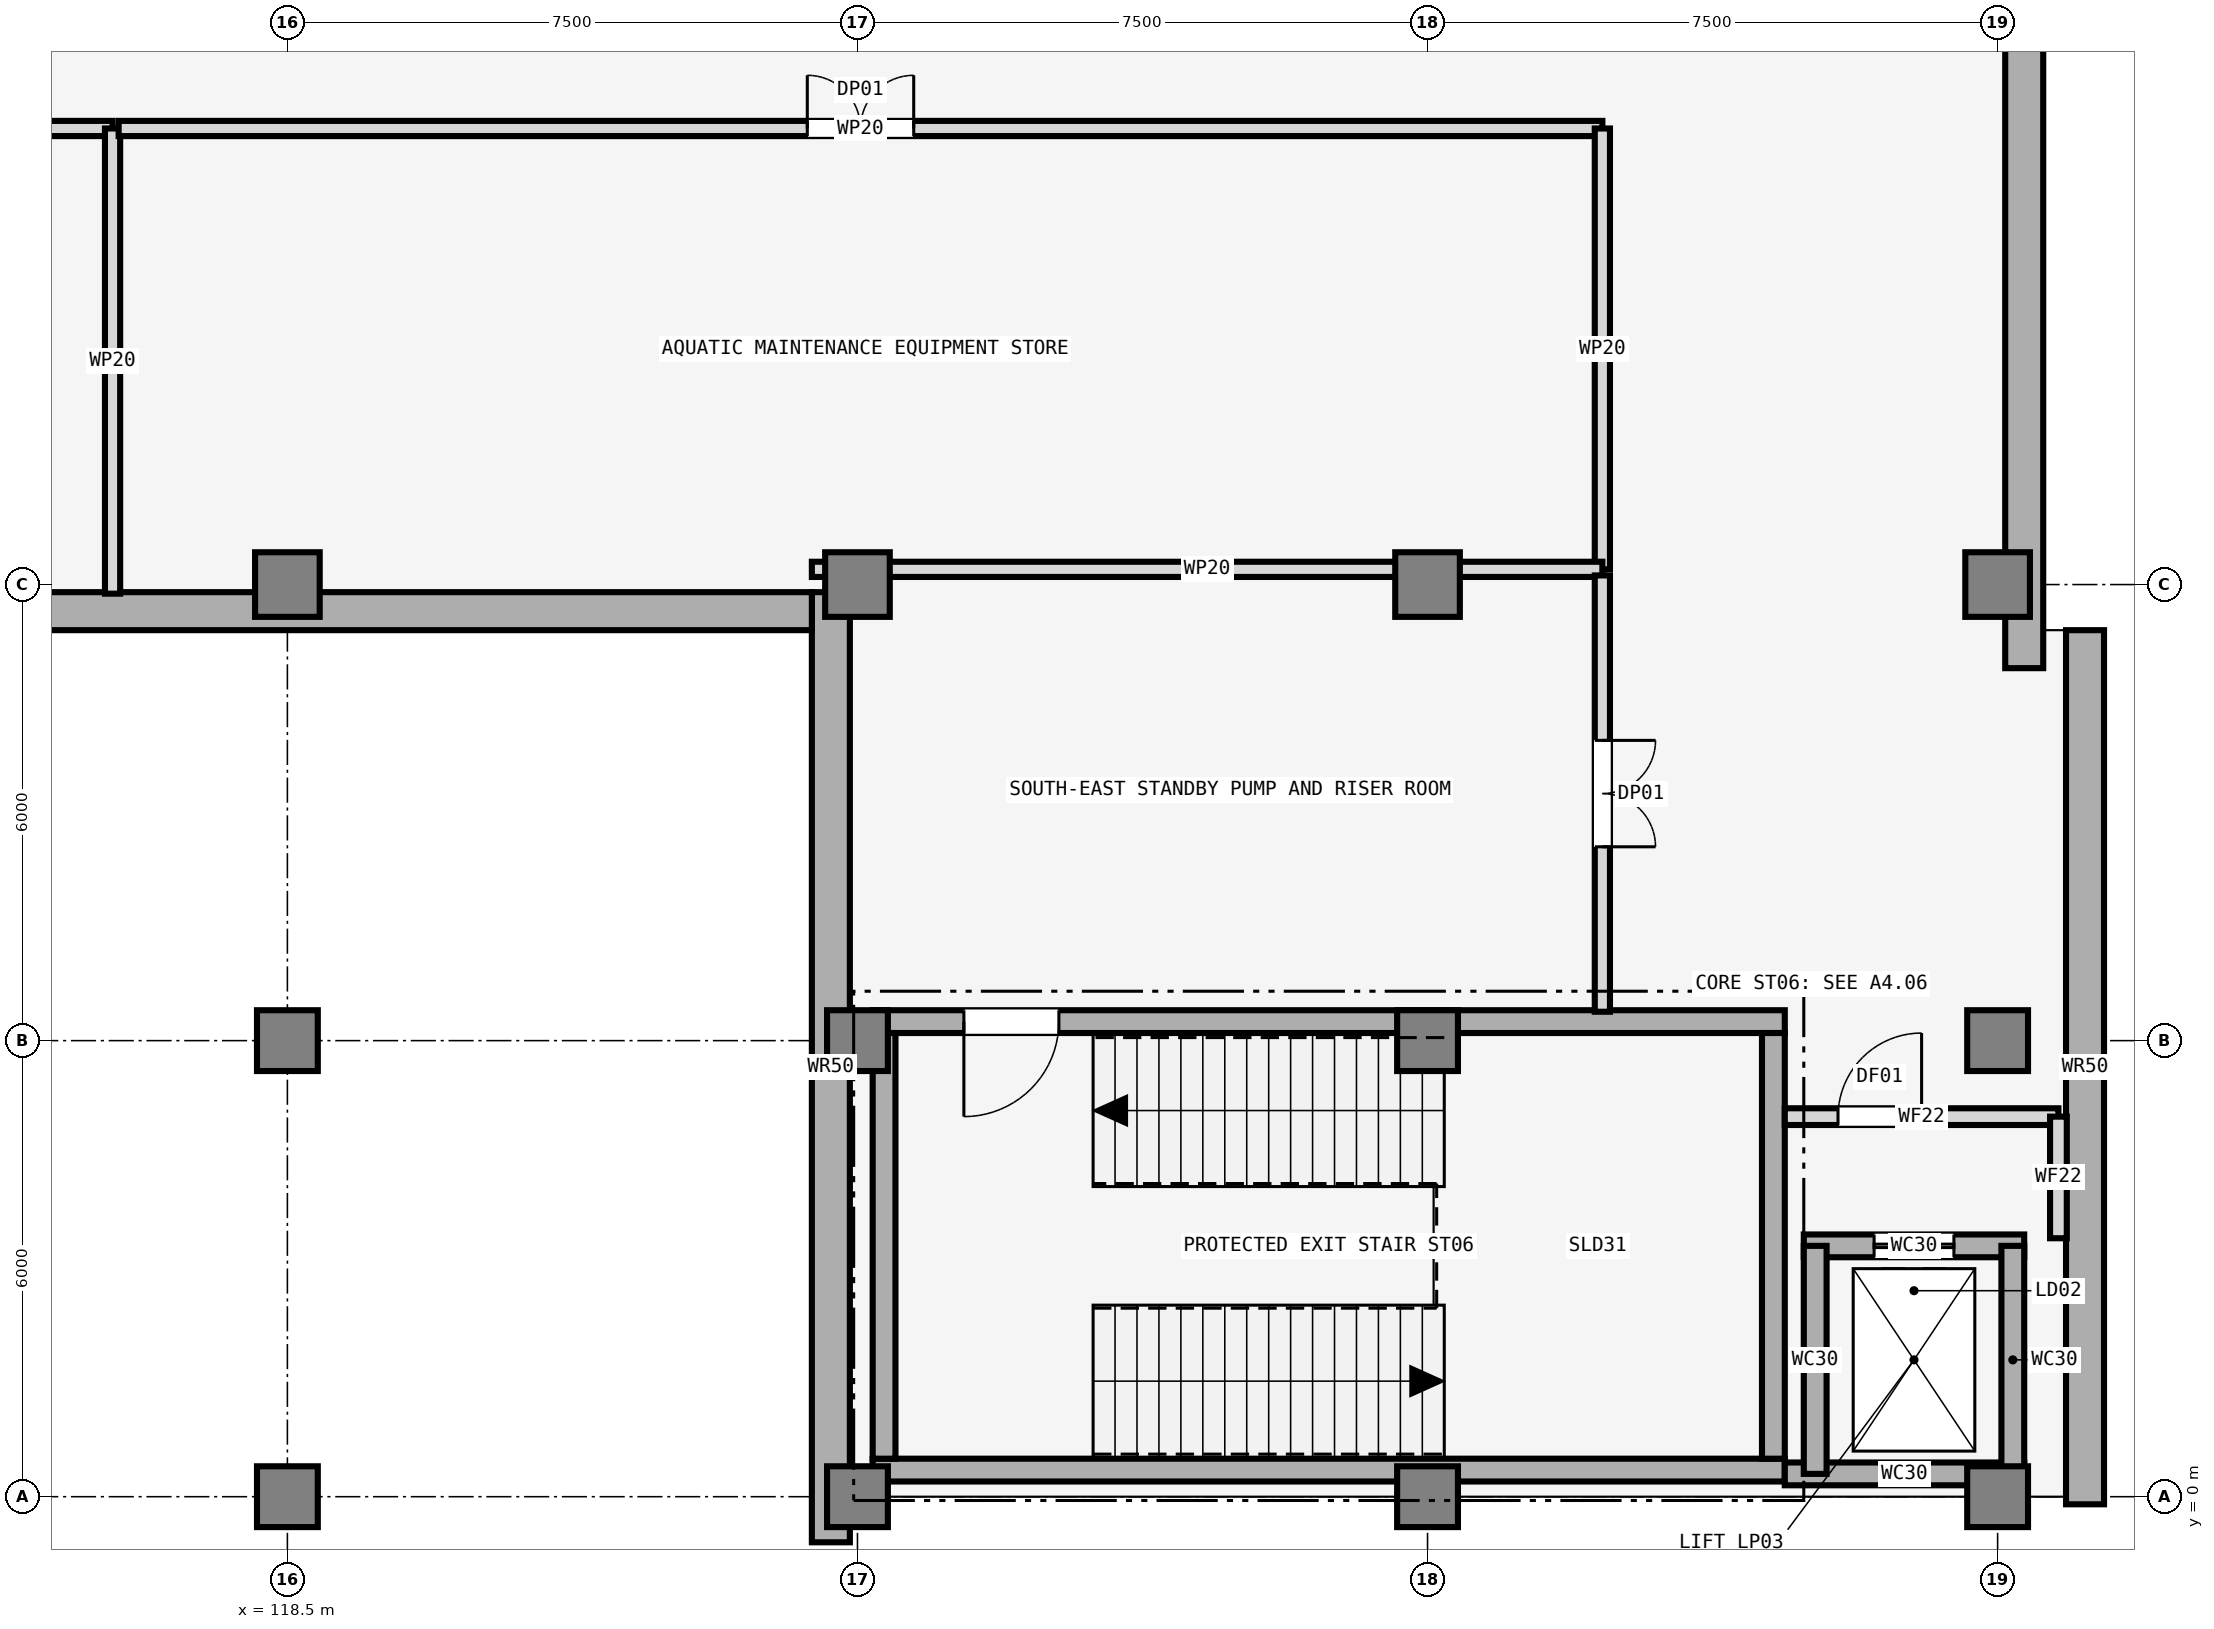
"""IFC4 building model, lengths in metres.
Left out: names, types, materials, properties, quantities, classifications, styles, units other than length and angle.
Written with IfcOpenShell. Run it as: python <this file> out.ifc"""

import sys

from ifc_helpers import new_model, si_unit, direction, frame, frame_2d, origin, origin_2d, place, context, subcontext, project, spatial, rectangle, extrude, element, fill, save


model = new_model("IFC4")
c1 = context("Model", 3, precision=1e-05, world=origin(), true_north=direction((0.0, 1.0)))
c2 = subcontext(c1, "Body", "Model", "MODEL_VIEW")
j1 = project(units=[si_unit("LENGTHUNIT", "METRE"), si_unit("PLANEANGLEUNIT", "RADIAN")], contexts=[c1])
p1 = place(None, origin())
s1 = spatial("IfcSite", under=j1, at=p1, CompositionType="ELEMENT")
p2 = place(p1, origin())
s2 = spatial("IfcBuilding", under=s1, at=p2, CompositionType="ELEMENT")
p3 = place(p2, frame((0.0, 0.0, -5.4)))
s3 = spatial("IfcBuildingStorey", under=s2, at=p3, CompositionType="ELEMENT", Elevation=-5.4)
p4 = place(p3, frame((141.35, 58.6, 0.0), z_axis=(0.0, 0.0, 1.0), x_axis=(0.0, -1.0, 0.0)))
e1 = element("IfcWall", 1, at=p4, inside=s3, PredefinedType="USERDEFINED", context=c2, shape_type="SweptSolid", body=[
    extrude(rectangle(XDim=47.7, YDim=0.5, at=frame_2d((23.85, 0.0))), origin(), (0.0, 0.0, 1.0), 5.08),
])
p5 = place(p3, frame((142.15, 11.4, 0.0), z_axis=(0.0, 0.0, 1.0), x_axis=(0.0, -1.0, 0.0)))
e2 = element("IfcWall", 2, at=p5, inside=s3, PredefinedType="USERDEFINED", context=c2, shape_type="SweptSolid", body=[
    extrude(rectangle(XDim=11.5, YDim=0.5, at=frame_2d((5.75, 0.0))), origin(), (0.0, 0.0, 1.0), 5.08),
])
p6 = place(p3, frame((142.4, -0.35, 0.0), z_axis=(0.0, 0.0, 1.0), x_axis=(-1.0, 0.0, 0.0)))
e3 = element("IfcWall", 3, at=p6, inside=s3, PredefinedType="USERDEFINED", context=c2, shape_type="SweptSolid", body=[
    extrude(rectangle(XDim=16.5, YDim=0.5, at=frame_2d((8.25, 0.0))), origin(), (0.0, 0.0, 1.0), 5.08),
])
p7 = place(p3, frame((125.65, -0.6, 0.0), z_axis=(0.0, 0.0, 1.0), x_axis=(0.0, 1.0, 0.0)))
e4 = element("IfcWall", 4, at=p7, inside=s3, PredefinedType="USERDEFINED", context=c2, shape_type="SweptSolid", body=[
    extrude(rectangle(XDim=12.5, YDim=0.5, at=frame_2d((6.25, 0.0))), origin(), (0.0, 0.0, 1.0), 5.08),
])
p8 = place(p3, frame((125.4, 11.65, 0.0), z_axis=(0.0, 0.0, 1.0), x_axis=(-1.0, 0.0, 0.0)))
e5 = element("IfcWall", 5, at=p8, inside=s3, PredefinedType="USERDEFINED", context=c2, shape_type="SweptSolid", body=[
    extrude(rectangle(XDim=69.6, YDim=0.5, at=frame_2d((34.8, 0.0))), origin(), (0.0, 0.0, 1.0), 5.08),
])
for number, where, z_axis, x_axis in (
    (6, (118.5, 0.0, 0.0), (0.0, 0.0, 1.0), (1.0, 0.0, 0.0)),
    (7, (118.5, 6.0, 0.0), (0.0, 0.0, 1.0), (1.0, 0.0, 0.0)),
):
    element("IfcColumn", number, at=place(p3, frame(where, z_axis=z_axis, x_axis=x_axis)), inside=s3, PredefinedType="COLUMN", context=c2, shape_type="SweptSolid", body=[
        extrude(rectangle(XDim=0.8, YDim=0.8, at=origin_2d()), origin(), (0.0, 0.0, 1.0), 5.4),
    ])
p9 = place(p3, frame((118.5, 12.0, 0.0), z_axis=(0.0, 0.0, 1.0), x_axis=(1.0, 0.0, 0.0)))
e8 = element("IfcColumn", 8, at=p9, inside=s3, PredefinedType="COLUMN", context=c2, shape_type="SweptSolid", body=[
    extrude(rectangle(XDim=0.85, YDim=0.85, at=origin_2d()), origin(), (0.0, 0.0, 1.0), 5.4),
])
for number, where, z_axis, x_axis in (
    (9, (126.0, 0.0, 0.0), (0.0, 0.0, 1.0), (1.0, 0.0, 0.0)),
    (10, (126.0, 6.0, 0.0), (0.0, 0.0, 1.0), (1.0, 0.0, 0.0)),
):
    element("IfcColumn", number, at=place(p3, frame(where, z_axis=z_axis, x_axis=x_axis)), inside=s3, PredefinedType="COLUMN", context=c2, shape_type="SweptSolid", body=[
        extrude(rectangle(XDim=0.8, YDim=0.8, at=origin_2d()), origin(), (0.0, 0.0, 1.0), 5.4),
    ])
p10 = place(p3, frame((126.0, 12.0, 0.0), z_axis=(0.0, 0.0, 1.0), x_axis=(1.0, 0.0, 0.0)))
e11 = element("IfcColumn", 11, at=p10, inside=s3, PredefinedType="COLUMN", context=c2, shape_type="SweptSolid", body=[
    extrude(rectangle(XDim=0.85, YDim=0.85, at=origin_2d()), origin(), (0.0, 0.0, 1.0), 5.4),
])
for number, where, z_axis, x_axis in (
    (12, (133.5, 0.0, 0.0), (0.0, 0.0, 1.0), (1.0, 0.0, 0.0)),
    (13, (133.5, 6.0, 0.0), (0.0, 0.0, 1.0), (1.0, 0.0, 0.0)),
):
    element("IfcColumn", number, at=place(p3, frame(where, z_axis=z_axis, x_axis=x_axis)), inside=s3, PredefinedType="COLUMN", context=c2, shape_type="SweptSolid", body=[
        extrude(rectangle(XDim=0.8, YDim=0.8, at=origin_2d()), origin(), (0.0, 0.0, 1.0), 5.4),
    ])
p11 = place(p3, frame((133.5, 12.0, 0.0), z_axis=(0.0, 0.0, 1.0), x_axis=(1.0, 0.0, 0.0)))
e14 = element("IfcColumn", 14, at=p11, inside=s3, PredefinedType="COLUMN", context=c2, shape_type="SweptSolid", body=[
    extrude(rectangle(XDim=0.85, YDim=0.85, at=origin_2d()), origin(), (0.0, 0.0, 1.0), 5.4),
])
for number, where, z_axis, x_axis in (
    (15, (141.0, 0.0, 0.0), (0.0, 0.0, 1.0), (1.0, 0.0, 0.0)),
    (16, (141.0, 6.0, 0.0), (0.0, 0.0, 1.0), (1.0, 0.0, 0.0)),
):
    element("IfcColumn", number, at=place(p3, frame(where, z_axis=z_axis, x_axis=x_axis)), inside=s3, PredefinedType="COLUMN", context=c2, shape_type="SweptSolid", body=[
        extrude(rectangle(XDim=0.8, YDim=0.8, at=origin_2d()), origin(), (0.0, 0.0, 1.0), 5.4),
    ])
p12 = place(p3, frame((141.0, 12.0, 0.0), z_axis=(0.0, 0.0, 1.0), x_axis=(1.0, 0.0, 0.0)))
e17 = element("IfcColumn", 17, at=p12, inside=s3, PredefinedType="COLUMN", context=c2, shape_type="SweptSolid", body=[
    extrude(rectangle(XDim=0.85, YDim=0.85, at=origin_2d()), origin(), (0.0, 0.0, 1.0), 5.4),
])
p13 = place(p3, frame((138.2, 0.35, 0.0), z_axis=(0.0, 0.0, 1.0), x_axis=(-1.0, 0.0, 0.0)))
e18 = element("IfcWall", 18, at=p13, inside=s3, PredefinedType="SHEAR", context=c2, shape_type="SweptSolid", body=[
    extrude(rectangle(XDim=12.0, YDim=0.3, at=frame_2d((6.0, 0.0))), origin(), (0.0, 0.0, 1.0), 5.4),
])
p14 = place(p3, frame((138.2, 6.25, 0.0), z_axis=(0.0, 0.0, 1.0), x_axis=(-1.0, 0.0, 0.0)))
e19 = element("IfcWall", 19, at=p14, inside=s3, PredefinedType="SHEAR", context=c2, shape_type="SweptSolid", body=[
    extrude(rectangle(XDim=12.0, YDim=0.3, at=frame_2d((6.0, 0.0))), origin(), (0.0, 0.0, 1.0), 5.4),
])
p15 = place(p14, frame((9.55, 0.0, 0.0)))
e20 = element("IfcOpeningElement", 20, at=p15, cuts=e19, PredefinedType="OPENING", context=c2, shape_type="SweptSolid", body=[
    extrude(rectangle(XDim=1.25, YDim=2.15, at=frame_2d((0.625, 1.075))), frame((0.0, 0.16, 0.0), z_axis=(0.0, -1.0, 0.0), x_axis=(1.0, 0.0, 0.0)), (0.0, 0.0, 1.0), 0.32),
])
for number, where, z_axis, x_axis in (
    (21, (126.35, 6.1, 0.0), (0.0, 0.0, 1.0), (0.0, -1.0, 0.0)),
    (22, (138.05, 0.5, 0.0), (0.0, 0.0, 1.0), (0.0, 1.0, 0.0)),
):
    element("IfcWall", number, at=place(p3, frame(where, z_axis=z_axis, x_axis=x_axis)), inside=s3, PredefinedType="SHEAR", context=c2, shape_type="SweptSolid", body=[
        extrude(rectangle(XDim=5.6, YDim=0.3, at=frame_2d((2.8, 0.0))), origin(), (0.0, 0.0, 1.0), 5.4),
    ])
p16 = place(p3, frame((138.2, 0.3, 0.0), z_axis=(0.0, 0.0, 1.0), x_axis=(1.0, 0.0, 0.0)))
e23 = element("IfcWall", 23, at=p16, inside=s3, PredefinedType="SHEAR", context=c2, shape_type="SweptSolid", body=[
    extrude(rectangle(XDim=3.15, YDim=0.3, at=frame_2d((1.575, 0.0))), origin(), (0.0, 0.0, 1.0), 5.4),
])
p17 = place(p3, frame((141.35, 3.3, 0.0), z_axis=(0.0, 0.0, 1.0), x_axis=(-1.0, 0.0, 0.0)))
e24 = element("IfcWall", 24, at=p17, inside=s3, PredefinedType="SHEAR", context=c2, shape_type="SweptSolid", body=[
    extrude(rectangle(XDim=2.9, YDim=0.3, at=frame_2d((1.45, 0.0))), origin(), (0.0, 0.0, 1.0), 5.4),
])
p18 = place(p17, frame((0.925, 0.0, 0.0)))
e25 = element("IfcOpeningElement", 25, at=p18, cuts=e24, PredefinedType="OPENING", context=c2, shape_type="SweptSolid", body=[
    extrude(rectangle(XDim=1.05, YDim=2.15, at=frame_2d((0.525, 1.075))), frame((0.0, 0.16, 0.0), z_axis=(0.0, -1.0, 0.0), x_axis=(1.0, 0.0, 0.0)), (0.0, 0.0, 1.0), 0.32),
])
for number, where, z_axis, x_axis in (
    (26, (138.6, 3.3, 0.0), (0.0, 0.0, 1.0), (0.0, -1.0, 0.0)),
    (27, (141.2, 0.3, 0.0), (0.0, 0.0, 1.0), (0.0, 1.0, 0.0)),
):
    element("IfcWall", number, at=place(p3, frame(where, z_axis=z_axis, x_axis=x_axis)), inside=s3, PredefinedType="SHEAR", context=c2, shape_type="SweptSolid", body=[
        extrude(rectangle(XDim=3.0, YDim=0.3, at=frame_2d((1.5, 0.0))), origin(), (0.0, 0.0, 1.0), 5.4),
    ])
p19 = place(p3, frame((138.2, 5.0, 0.0), z_axis=(0.0, 0.0, 1.0), x_axis=(1.0, 0.0, 0.0)))
e28 = element("IfcWall", 28, at=p19, inside=s3, PredefinedType="SOLIDWALL", context=c2, shape_type="SweptSolid", body=[
    extrude(rectangle(XDim=3.6, YDim=0.22, at=frame_2d((1.8, 0.0))), origin(), (0.0, 0.0, 1.0), 4.05),
])
p20 = place(p19, frame((0.7, 0.0, 0.0)))
e29 = element("IfcOpeningElement", 29, at=p20, cuts=e28, PredefinedType="OPENING", context=c2, shape_type="SweptSolid", body=[
    extrude(rectangle(XDim=1.1, YDim=2.15, at=frame_2d((0.55, 1.075))), frame((0.0, 0.12, 0.0), z_axis=(0.0, -1.0, 0.0), x_axis=(1.0, 0.0, 0.0)), (0.0, 0.0, 1.0), 0.24),
])
p21 = place(p3, frame((141.8, 3.4, 0.0), z_axis=(0.0, 0.0, 1.0), x_axis=(0.0, 1.0, 0.0)))
e30 = element("IfcWall", 30, at=p21, inside=s3, PredefinedType="SOLIDWALL", context=c2, shape_type="SweptSolid", body=[
    extrude(rectangle(XDim=1.6, YDim=0.22, at=frame_2d((0.8, 0.0))), origin(), (0.0, 0.0, 1.0), 4.05),
])
p22 = place(p3, frame((96.7, 18.0, 0.0), z_axis=(0.0, 0.0, 1.0), x_axis=(1.0, 0.0, 0.0)))
e31 = element("IfcWall", 31, at=p22, inside=s3, PredefinedType="PARTITIONING", context=c2, shape_type="SweptSolid", body=[
    extrude(rectangle(XDim=19.5, YDim=0.2, at=frame_2d((9.75, 0.0))), origin(), (0.0, 0.0, 1.0), 4.05),
])
p23 = place(p22, frame((13.45, 0.0, 0.0)))
e32 = element("IfcOpeningElement", 32, at=p23, cuts=e31, PredefinedType="OPENING", context=c2, shape_type="SweptSolid", body=[
    extrude(rectangle(XDim=1.4, YDim=2.2, at=frame_2d((0.7, 1.1))), frame((0.0, 0.11, 0.0), z_axis=(0.0, -1.0, 0.0), x_axis=(1.0, 0.0, 0.0)), (0.0, 0.0, 1.0), 0.22),
])
p24 = place(p3, frame((116.2, 18.0, 0.0), z_axis=(0.0, 0.0, 1.0), x_axis=(0.0, -1.0, 0.0)))
e33 = element("IfcWall", 33, at=p24, inside=s3, PredefinedType="PARTITIONING", context=c2, shape_type="SweptSolid", body=[
    extrude(rectangle(XDim=6.12, YDim=0.2, at=frame_2d((3.06, 0.0))), origin(), (0.0, 0.0, 1.0), 4.05),
])
p25 = place(p3, frame((116.28, 18.0, 0.0), z_axis=(0.0, 0.0, 1.0), x_axis=(1.0, 0.0, 0.0)))
e34 = element("IfcWall", 34, at=p25, inside=s3, PredefinedType="PARTITIONING", context=c2, shape_type="SweptSolid", body=[
    extrude(rectangle(XDim=19.52, YDim=0.2, at=frame_2d((9.76, 0.0))), origin(), (0.0, 0.0, 1.0), 4.05),
])
p26 = place(p25, frame((9.06, 0.0, 0.0)))
e35 = element("IfcOpeningElement", 35, at=p26, cuts=e34, PredefinedType="OPENING", context=c2, shape_type="SweptSolid", body=[
    extrude(rectangle(XDim=1.4, YDim=2.2, at=frame_2d((0.7, 1.1))), frame((0.0, 0.11, 0.0), z_axis=(0.0, -1.0, 0.0), x_axis=(1.0, 0.0, 0.0)), (0.0, 0.0, 1.0), 0.22),
])
p27 = place(p3, frame((135.8, 18.0, 0.0), z_axis=(0.0, 0.0, 1.0), x_axis=(0.0, -1.0, 0.0)))
e36 = element("IfcWall", 36, at=p27, inside=s3, PredefinedType="PARTITIONING", context=c2, shape_type="SweptSolid", body=[
    extrude(rectangle(XDim=5.8, YDim=0.2, at=frame_2d((2.9, 0.0))), origin(), (0.0, 0.0, 1.0), 4.05),
])
p28 = place(p3, frame((135.8, 12.2, 0.0), z_axis=(0.0, 0.0, 1.0), x_axis=(-1.0, 0.0, 0.0)))
e37 = element("IfcWall", 37, at=p28, inside=s3, PredefinedType="PARTITIONING", context=c2, shape_type="SweptSolid", body=[
    extrude(rectangle(XDim=10.4, YDim=0.2, at=frame_2d((5.2, 0.0))), origin(), (0.0, 0.0, 1.0), 4.05),
])
p29 = place(p3, frame((135.8, 12.12, 0.0), z_axis=(0.0, 0.0, 1.0), x_axis=(0.0, -1.0, 0.0)))
e38 = element("IfcWall", 38, at=p29, inside=s3, PredefinedType="PARTITIONING", context=c2, shape_type="SweptSolid", body=[
    extrude(rectangle(XDim=5.74, YDim=0.2, at=frame_2d((2.87, 0.0))), origin(), (0.0, 0.0, 1.0), 4.05),
])
p30 = place(p29, frame((2.17, 0.0, 0.0)))
e39 = element("IfcOpeningElement", 39, at=p30, cuts=e38, PredefinedType="OPENING", context=c2, shape_type="SweptSolid", body=[
    extrude(rectangle(XDim=1.4, YDim=2.2, at=frame_2d((0.7, 1.1))), frame((0.0, 0.11, 0.0), z_axis=(0.0, -1.0, 0.0), x_axis=(1.0, 0.0, 0.0)), (0.0, 0.0, 1.0), 0.22),
])
p31 = place(p15, origin())
e40 = element("IfcDoor", 40, at=p31, inside=s3, OperationType="SINGLE_SWING_RIGHT", PredefinedType="DOOR", context=c2, shape_type="SweptSolid", body=[
    extrude(rectangle(XDim=1.25, YDim=2.15, at=frame_2d((0.625, 1.075))), frame((0.0, 0.025, 0.0), z_axis=(0.0, -1.0, 0.0), x_axis=(1.0, 0.0, 0.0)), (0.0, 0.0, 1.0), 0.05),
])
fill(e20, e40)
p32 = place(p18, origin())
e41 = element("IfcDoor", 41, at=p32, inside=s3, OperationType="DOUBLE_DOOR_SLIDING", PredefinedType="DOOR", context=c2, shape_type="SweptSolid", body=[
    extrude(rectangle(XDim=1.05, YDim=2.15, at=frame_2d((0.525, 1.075))), frame((0.0, 0.025, 0.0), z_axis=(0.0, -1.0, 0.0), x_axis=(1.0, 0.0, 0.0)), (0.0, 0.0, 1.0), 0.05),
])
fill(e25, e41)
p33 = place(p20, origin())
e42 = element("IfcDoor", 42, at=p33, inside=s3, OperationType="SINGLE_SWING_RIGHT", PredefinedType="DOOR", context=c2, shape_type="SweptSolid", body=[
    extrude(rectangle(XDim=1.1, YDim=2.15, at=frame_2d((0.55, 1.075))), frame((0.0, 0.025, 0.0), z_axis=(0.0, -1.0, 0.0), x_axis=(1.0, 0.0, 0.0)), (0.0, 0.0, 1.0), 0.05),
])
fill(e29, e42)
p34 = place(p26, origin())
e43 = element("IfcDoor", 43, at=p34, inside=s3, OperationType="DOUBLE_DOOR_SINGLE_SWING", PredefinedType="DOOR", context=c2, shape_type="SweptSolid", body=[
    extrude(rectangle(XDim=1.4, YDim=2.2, at=frame_2d((0.7, 1.1))), frame((0.0, 0.025, 0.0), z_axis=(0.0, -1.0, 0.0), x_axis=(1.0, 0.0, 0.0)), (0.0, 0.0, 1.0), 0.05),
])
fill(e35, e43)
p35 = place(p30, origin())
e44 = element("IfcDoor", 44, at=p35, inside=s3, OperationType="DOUBLE_DOOR_SINGLE_SWING", PredefinedType="DOOR", context=c2, shape_type="SweptSolid", body=[
    extrude(rectangle(XDim=1.4, YDim=2.2, at=frame_2d((0.7, 1.1))), frame((0.0, 0.025, 0.0), z_axis=(0.0, -1.0, 0.0), x_axis=(1.0, 0.0, 0.0)), (0.0, 0.0, 1.0), 0.05),
])
fill(e39, e44)
save(model, sys.argv[1])
